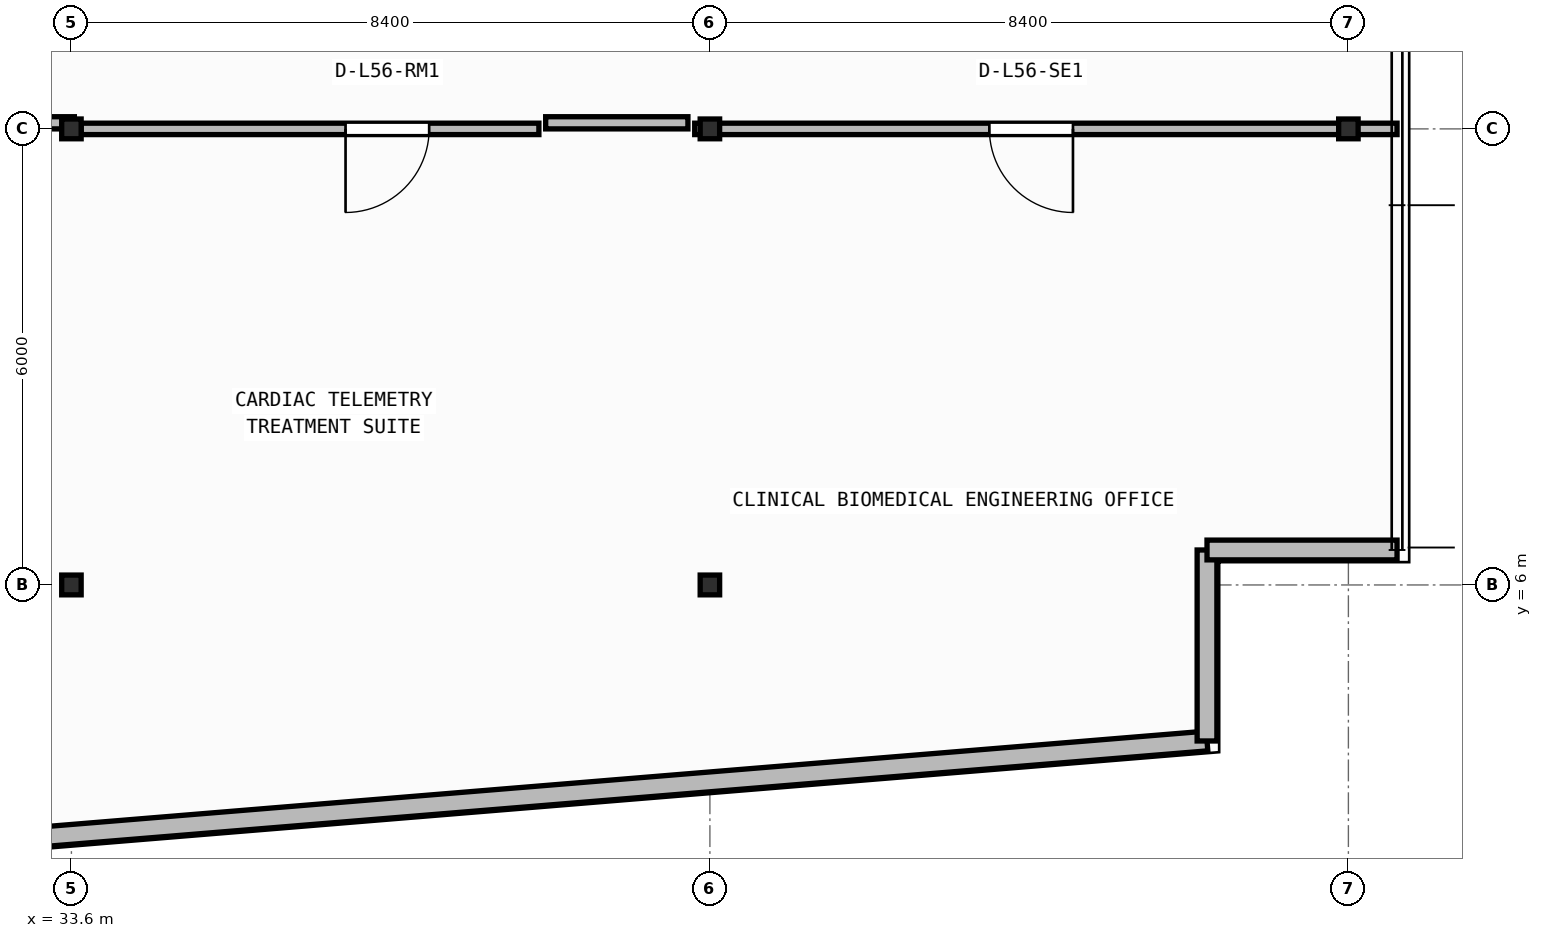
"""IFC4 building model, lengths in metres.
Left out: names, types, materials, properties, quantities, classifications, styles, units other than length and angle.
Written with IfcOpenShell. Run it as: python <this file> out.ifc"""

import sys

from ifc_helpers import new_model, si_unit, direction, frame, frame_2d, origin, origin_2d, place, context, subcontext, project, spatial, rectangle, i_section, extrude, element, fill, save


model = new_model("IFC4")
c1 = context("Model", 3, precision=1e-05, world=origin(), true_north=direction((0.0, 1.0)))
c2 = subcontext(c1, "Body", "Model", "MODEL_VIEW")
j1 = project(units=[si_unit("LENGTHUNIT", "METRE"), si_unit("PLANEANGLEUNIT", "RADIAN")], contexts=[c1])
p1 = place(None, origin())
s1 = spatial("IfcSite", under=j1, at=p1, CompositionType="ELEMENT")
p2 = place(p1, origin())
s2 = spatial("IfcBuilding", under=s1, at=p2, CompositionType="ELEMENT")
p3 = place(p2, frame((0.0, 0.0, 227.65)))
s3 = spatial("IfcBuildingStorey", under=s2, at=p3, CompositionType="ELEMENT", Elevation=227.65)
for number, where, z_axis, x_axis in (
    (1, (33.6, 6.0, 0.0), (0.0, 0.0, 1.0), (1.0, 0.0, 0.0)),
    (2, (42.0, 6.0, 0.0), (0.0, 0.0, 1.0), (1.0, 0.0, 0.0)),
    (3, (33.6, 12.0, 0.0), (0.0, 0.0, 1.0), (1.0, 0.0, 0.0)),
    (4, (42.0, 12.0, 0.0), (0.0, 0.0, 1.0), (1.0, 0.0, 0.0)),
    (5, (50.4, 12.0, 0.0), (0.0, 0.0, 1.0), (1.0, 0.0, 0.0)),
):
    element("IfcColumn", number, at=place(p3, frame(where, z_axis=z_axis, x_axis=x_axis)), inside=s3, PredefinedType="COLUMN", context=c2, shape_type="SweptSolid", body=[
        extrude(i_section(OverallWidth=0.256, OverallDepth=0.26, WebThickness=0.01, FlangeThickness=0.017, FilletRadius=0.013, at=origin_2d()), origin(), (0.0, 0.0, 1.0), 3.95),
    ])
p4 = place(p3, frame((2.66, 0.174, 0.0), z_axis=(0.0, 0.0, 1.0), x_axis=(0.996634028439, 0.081979347142, 0.0)))
e6 = element("IfcWall", 6, at=p4, inside=s3, PredefinedType="STANDARD", context=c2, shape_type="SweptSolid", body=[
    extrude(rectangle(XDim=46.035, YDim=0.26, at=frame_2d((23.018, 0.0))), origin(), (0.0, 0.0, 1.0), 3.71),
])
p5 = place(p4, frame((21.817, 0.0, 0.9)))
e7 = element("IfcOpeningElement", 7, at=p5, cuts=e6, PredefinedType="OPENING", context=c2, shape_type="SweptSolid", body=[
    extrude(rectangle(XDim=2.4, YDim=1.65, at=frame_2d((1.2, 0.825))), frame((0.0, 0.14, 0.0), z_axis=(0.0, -1.0, 0.0), x_axis=(1.0, 0.0, 0.0)), (0.0, 0.0, 1.0), 0.28),
])
p6 = place(p3, frame((48.54, 3.948, 0.0), z_axis=(0.0, 0.0, 1.0), x_axis=(0.0, 1.0, 0.0)))
e8 = element("IfcWall", 8, at=p6, inside=s3, PredefinedType="STANDARD", context=c2, shape_type="SweptSolid", body=[
    extrude(rectangle(XDim=2.512, YDim=0.26, at=frame_2d((1.256, 0.0))), origin(), (0.0, 0.0, 1.0), 3.71),
])
p7 = place(p3, frame((48.54, 6.46, 0.0), z_axis=(0.0, 0.0, 1.0), x_axis=(1.0, 0.0, 0.0)))
e9 = element("IfcWall", 9, at=p7, inside=s3, PredefinedType="STANDARD", context=c2, shape_type="SweptSolid", body=[
    extrude(rectangle(XDim=2.5, YDim=0.26, at=frame_2d((1.25, 0.0))), origin(), (0.0, 0.0, 1.0), 3.71),
])
p8 = place(p3, frame((39.75, 12.0, 0.0), z_axis=(0.0, 0.0, 1.0), x_axis=(-1.0, 0.0, 0.0)))
e10 = element("IfcWall", 10, at=p8, inside=s3, PredefinedType="PARTITIONING", context=c2, shape_type="SweptSolid", body=[
    extrude(rectangle(XDim=6.022, YDim=0.15, at=frame_2d((3.011, 0.0))), origin(), (0.0, 0.0, 1.0), 3.152),
])
p9 = place(p8, frame((1.444, 0.0, 0.0)))
e11 = element("IfcOpeningElement", 11, at=p9, cuts=e10, PredefinedType="OPENING", context=c2, shape_type="SweptSolid", body=[
    extrude(rectangle(XDim=1.1, YDim=2.1, at=frame_2d((0.55, 1.05))), frame((0.0, 0.085, 0.0), z_axis=(0.0, -1.0, 0.0), x_axis=(1.0, 0.0, 0.0)), (0.0, 0.0, 1.0), 0.17),
])
p10 = place(p3, frame((51.04, 12.0, 0.0), z_axis=(0.0, 0.0, 1.0), x_axis=(-1.0, 0.0, 0.0)))
e12 = element("IfcWall", 12, at=p10, inside=s3, PredefinedType="PARTITIONING", context=c2, shape_type="SweptSolid", body=[
    extrude(rectangle(XDim=9.24, YDim=0.15, at=frame_2d((4.62, 0.0))), origin(), (0.0, 0.0, 1.0), 3.152),
])
p11 = place(p10, frame((4.263, 0.0, 0.0)))
e13 = element("IfcOpeningElement", 13, at=p11, cuts=e12, PredefinedType="OPENING", context=c2, shape_type="SweptSolid", body=[
    extrude(rectangle(XDim=1.1, YDim=2.1, at=frame_2d((0.55, 1.05))), frame((0.0, 0.085, 0.0), z_axis=(0.0, -1.0, 0.0), x_axis=(1.0, 0.0, 0.0)), (0.0, 0.0, 1.0), 0.17),
])
p12 = place(p3, frame((31.439, 12.08, 0.0), z_axis=(0.0, 0.0, 1.0), x_axis=(1.0, 0.0, 0.0)))
e14 = element("IfcWall", 14, at=p12, inside=s3, PredefinedType="PARTITIONING", context=c2, shape_type="SweptSolid", body=[
    extrude(rectangle(XDim=2.199, YDim=0.16, at=frame_2d((1.1, 0.0))), origin(), (0.0, 0.0, 1.0), 3.152),
])
p13 = place(p3, frame((39.839, 12.08, 0.0), z_axis=(0.0, 0.0, 1.0), x_axis=(1.0, 0.0, 0.0)))
e15 = element("IfcWall", 15, at=p13, inside=s3, PredefinedType="PARTITIONING", context=c2, shape_type="SweptSolid", body=[
    extrude(rectangle(XDim=1.871, YDim=0.16, at=frame_2d((0.936, 0.0))), origin(), (0.0, 0.0, 1.0), 3.152),
])
p14 = place(p9, origin())
e16 = element("IfcDoor", 16, at=p14, inside=s3, OperationType="SINGLE_SWING_RIGHT", PredefinedType="DOOR", context=c2, shape_type="SweptSolid", body=[
    extrude(rectangle(XDim=1.1, YDim=2.1, at=frame_2d((0.55, 1.05))), frame((0.0, 0.025, 0.0), z_axis=(0.0, -1.0, 0.0), x_axis=(1.0, 0.0, 0.0)), (0.0, 0.0, 1.0), 0.05),
])
fill(e11, e16)
p15 = place(p11, origin())
e17 = element("IfcDoor", 17, at=p15, inside=s3, OperationType="SINGLE_SWING_LEFT", PredefinedType="DOOR", context=c2, shape_type="SweptSolid", body=[
    extrude(rectangle(XDim=1.1, YDim=2.1, at=frame_2d((0.55, 1.05))), frame((0.0, 0.025, 0.0), z_axis=(0.0, -1.0, 0.0), x_axis=(1.0, 0.0, 0.0)), (0.0, 0.0, 1.0), 0.05),
])
fill(e13, e17)
save(model, sys.argv[1])
